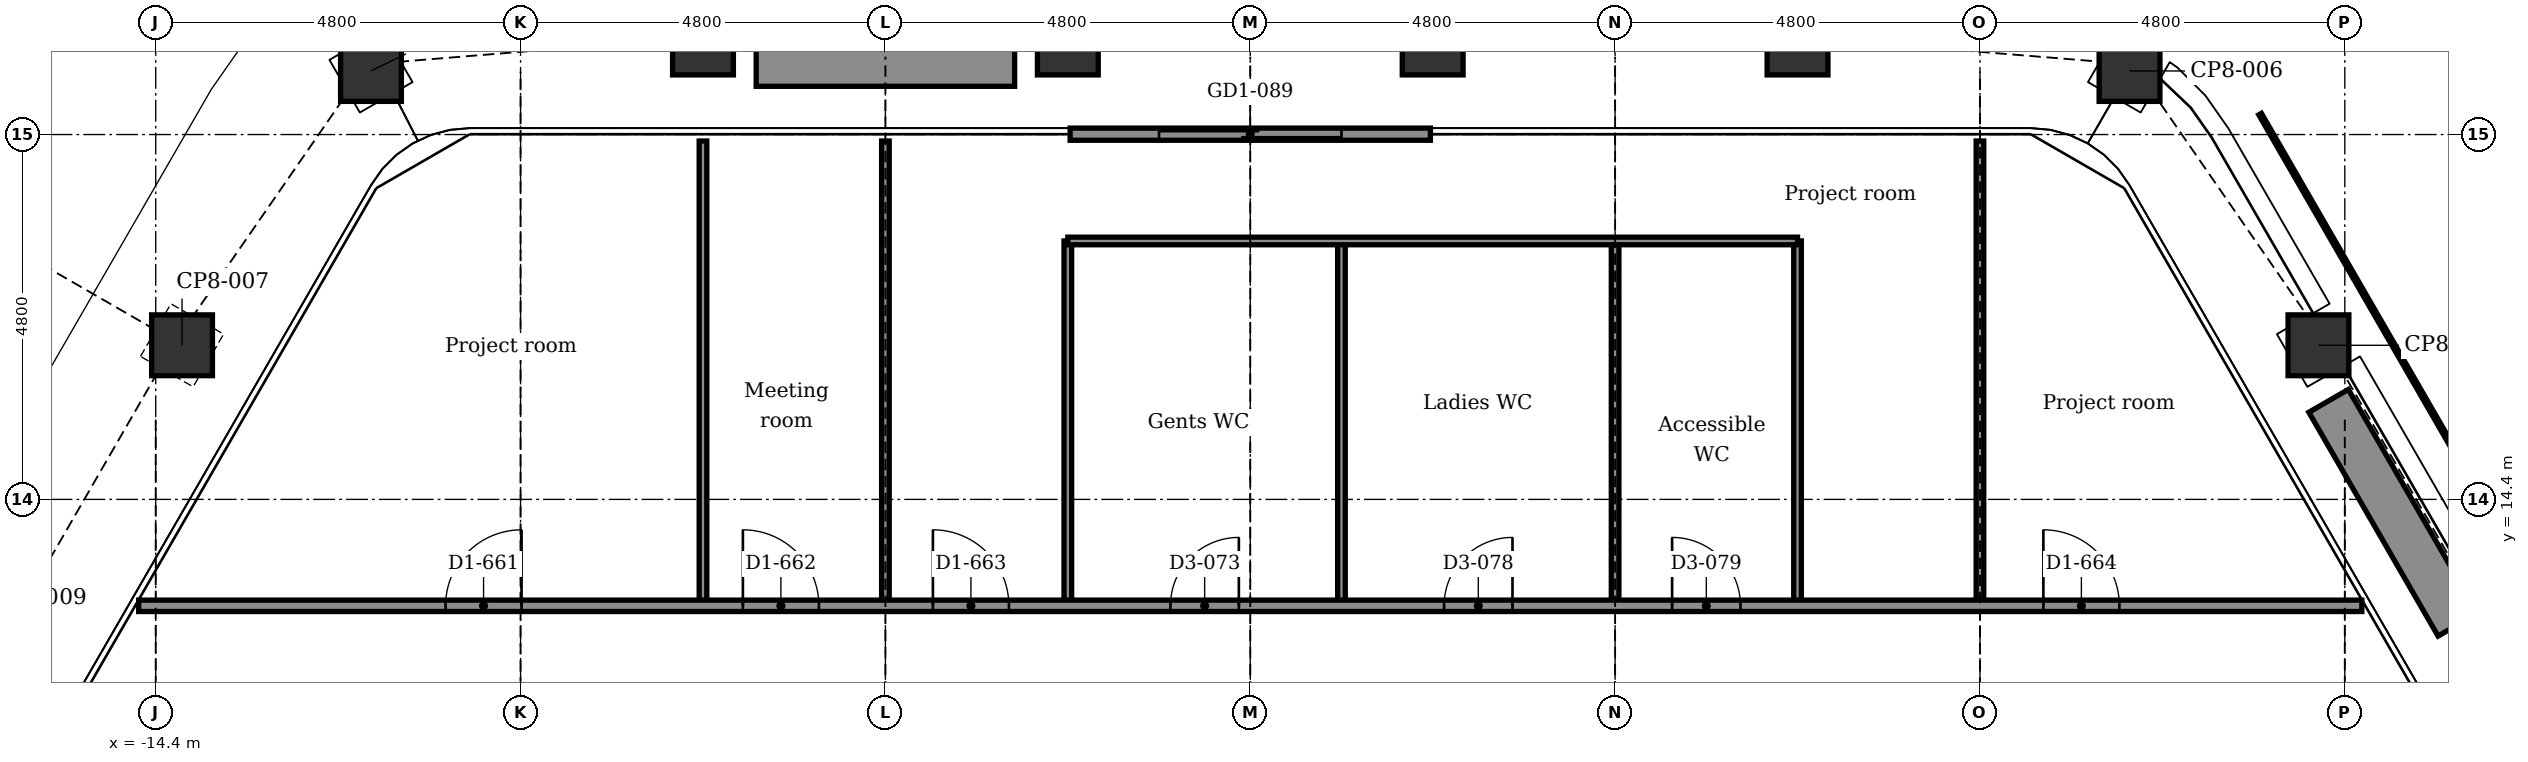
"""IFC4 building model, lengths in metres.
Left out: names, types, materials, properties, quantities, classifications, styles, units other than length and angle.
Written with IfcOpenShell. Run it as: python <this file> out.ifc"""

import sys

from ifc_helpers import new_model, si_unit, direction, frame, frame_2d, origin, origin_2d, place, context, subcontext, project, spatial, rectangle, extrude, element, fill, save


model = new_model("IFC4")
c1 = context("Model", 3, precision=1e-05, world=origin(), true_north=direction((0.0, 1.0)))
c2 = subcontext(c1, "Body", "Model", "MODEL_VIEW")
j1 = project(units=[si_unit("LENGTHUNIT", "METRE"), si_unit("PLANEANGLEUNIT", "RADIAN")], contexts=[c1])
p1 = place(None, origin())
s1 = spatial("IfcSite", under=j1, at=p1, CompositionType="ELEMENT")
p2 = place(p1, origin())
s2 = spatial("IfcBuilding", under=s1, at=p2, CompositionType="ELEMENT")
p3 = place(p2, frame((0.0, 0.0, 238.4)))
s3 = spatial("IfcBuildingStorey", under=s2, at=p3, CompositionType="ELEMENT", Elevation=238.4)
for number, where, z_axis, x_axis in (
    (1, (-11.568, 20.036, -0.15), (0.0, 0.0, 1.0), (0.866, 0.5, 0.0)),
    (2, (-7.2, 20.385, -0.15), (0.0, 0.0, 1.0), (1.0, 0.0, 0.0)),
    (3, (-2.4, 20.385, -0.15), (0.0, 0.0, 1.0), (1.0, 0.0, 0.0)),
    (4, (2.4, 20.385, -0.15), (0.0, 0.0, 1.0), (1.0, 0.0, 0.0)),
    (5, (7.2, 20.385, -0.15), (0.0, 0.0, 1.0), (1.0, 0.0, 0.0)),
    (6, (11.568, 20.036, -0.15), (0.0, 0.0, 1.0), (0.5, 0.866, 0.0)),
    (7, (14.054, 16.428, -0.15), (0.0, 0.0, 1.0), (0.866, 0.5, 0.0)),
    (8, (-14.054, 16.428, -0.15), (0.0, 0.0, 1.0), (0.5, 0.866, 0.0)),
):
    element("IfcColumn", number, at=place(p3, frame(where, z_axis=z_axis, x_axis=x_axis)), inside=s3, PredefinedType="COLUMN", context=c2, shape_type="SweptSolid", body=[
        extrude(rectangle(XDim=0.8, YDim=0.8, at=origin_2d()), origin(), (0.0, 0.0, 1.0), 3.9),
    ])
p4 = place(p3, frame((-2.37, 19.205, 0.0), z_axis=(0.0, 0.0, 1.0), x_axis=(1.0, 0.0, 0.0)))
e9 = element("IfcWall", 9, at=p4, inside=s3, PredefinedType="PARTITIONING", context=c2, shape_type="SweptSolid", body=[
    extrude(rectangle(XDim=4.74, YDim=0.16, at=frame_2d((2.37, 0.0))), origin(), (0.0, 0.0, 1.0), 3.75),
])
p5 = place(p4, frame((1.17, 0.0, 0.0)))
e10 = element("IfcOpeningElement", 10, at=p5, cuts=e9, PredefinedType="OPENING", context=c2, shape_type="SweptSolid", body=[
    extrude(rectangle(XDim=2.4, YDim=2.4, at=frame_2d((1.2, 1.2))), frame((0.0, 0.09, 0.0), z_axis=(0.0, -1.0, 0.0), x_axis=(1.0, 0.0, 0.0)), (0.0, 0.0, 1.0), 0.18),
])
p6 = place(p3, frame((-6.5, 20.135, 0.0), z_axis=(0.0, 0.0, 1.0), x_axis=(1.0, 0.0, 0.0)))
e11 = element("IfcWall", 11, at=p6, inside=s3, PredefinedType="USERDEFINED", context=c2, shape_type="SweptSolid", body=[
    extrude(rectangle(XDim=3.4, YDim=0.6, at=frame_2d((1.7, 0.0))), origin(), (0.0, 0.0, 1.0), 0.7),
])
p7 = place(p3, frame((14.187, 15.697, 0.0), z_axis=(0.0, 0.0, 1.0), x_axis=(0.499977295307, -0.866038511948, 0.0)))
e12 = element("IfcWall", 12, at=p7, inside=s3, PredefinedType="USERDEFINED", context=c2, shape_type="SweptSolid", body=[
    extrude(rectangle(XDim=3.4, YDim=0.6, at=frame_2d((1.7, 0.0))), origin(), (0.0, 0.0, 1.0), 0.7),
])
p8 = place(p3, frame((9.6, 13.0, 0.0), z_axis=(0.0, 0.0, 1.0), x_axis=(0.0, 1.0, 0.0)))
e13 = element("IfcWall", 13, at=p8, inside=s3, PredefinedType="PARTITIONING", context=c2, shape_type="SweptSolid", body=[
    extrude(rectangle(XDim=6.115, YDim=0.1, at=frame_2d((3.057, 0.0))), origin(), (0.0, 0.0, 1.0), 3.217),
])
p9 = place(p3, frame((7.2, 13.0, 0.0), z_axis=(0.0, 0.0, 1.0), x_axis=(0.0, 1.0, 0.0)))
e14 = element("IfcWall", 14, at=p9, inside=s3, PredefinedType="PARTITIONING", context=c2, shape_type="SweptSolid", body=[
    extrude(rectangle(XDim=4.8, YDim=0.1, at=frame_2d((2.4, 0.0))), origin(), (0.0, 0.0, 1.0), 3.75),
])
p10 = place(p3, frame((4.8, 13.0, 0.0), z_axis=(0.0, 0.0, 1.0), x_axis=(0.0, 1.0, 0.0)))
e15 = element("IfcWall", 15, at=p10, inside=s3, PredefinedType="PARTITIONING", context=c2, shape_type="SweptSolid", body=[
    extrude(rectangle(XDim=4.8, YDim=0.1, at=frame_2d((2.4, 0.0))), origin(), (0.0, 0.0, 1.0), 3.217),
])
for number, where, z_axis, x_axis in (
    (16, (1.2, 13.0, 0.0), (0.0, 0.0, 1.0), (0.0, 1.0, 0.0)),
    (17, (-2.4, 13.0, 0.0), (0.0, 0.0, 1.0), (0.0, 1.0, 0.0)),
):
    element("IfcWall", number, at=place(p3, frame(where, z_axis=z_axis, x_axis=x_axis)), inside=s3, PredefinedType="PARTITIONING", context=c2, shape_type="SweptSolid", body=[
        extrude(rectangle(XDim=4.8, YDim=0.1, at=frame_2d((2.4, 0.0))), origin(), (0.0, 0.0, 1.0), 3.75),
    ])
p11 = place(p3, frame((-4.8, 13.0, 0.0), z_axis=(0.0, 0.0, 1.0), x_axis=(0.0, 1.0, 0.0)))
e18 = element("IfcWall", 18, at=p11, inside=s3, PredefinedType="PARTITIONING", context=c2, shape_type="SweptSolid", body=[
    extrude(rectangle(XDim=6.115, YDim=0.1, at=frame_2d((3.057, 0.0))), origin(), (0.0, 0.0, 1.0), 3.217),
])
p12 = place(p3, frame((-7.2, 13.0, 0.0), z_axis=(0.0, 0.0, 1.0), x_axis=(0.0, 1.0, 0.0)))
e19 = element("IfcWall", 19, at=p12, inside=s3, PredefinedType="PARTITIONING", context=c2, shape_type="SweptSolid", body=[
    extrude(rectangle(XDim=6.115, YDim=0.1, at=frame_2d((3.057, 0.0))), origin(), (0.0, 0.0, 1.0), 3.75),
])
p13 = place(p3, frame((-14.624, 13.0, 0.0), z_axis=(0.0, 0.0, 1.0), x_axis=(1.0, 0.0, 0.0)))
e20 = element("IfcWall", 20, at=p13, inside=s3, PredefinedType="PARTITIONING", context=c2, shape_type="SweptSolid", body=[
    extrude(rectangle(XDim=29.248, YDim=0.15, at=frame_2d((14.624, 0.0))), origin(), (0.0, 0.0, 1.0), 3.75),
])
p14 = place(p13, frame((13.574, 0.0, 0.0)))
e21 = element("IfcOpeningElement", 21, at=p14, cuts=e20, PredefinedType="OPENING", context=c2, shape_type="SweptSolid", body=[
    extrude(rectangle(XDim=0.9, YDim=2.1, at=frame_2d((0.45, 1.05))), frame((0.0, 0.085, 0.0), z_axis=(0.0, -1.0, 0.0), x_axis=(1.0, 0.0, 0.0)), (0.0, 0.0, 1.0), 0.17),
])
p15 = place(p13, frame((17.174, 0.0, 0.0)))
e22 = element("IfcOpeningElement", 22, at=p15, cuts=e20, PredefinedType="OPENING", context=c2, shape_type="SweptSolid", body=[
    extrude(rectangle(XDim=0.9, YDim=2.1, at=frame_2d((0.45, 1.05))), frame((0.0, 0.085, 0.0), z_axis=(0.0, -1.0, 0.0), x_axis=(1.0, 0.0, 0.0)), (0.0, 0.0, 1.0), 0.17),
])
p16 = place(p13, frame((20.174, 0.0, 0.0)))
e23 = element("IfcOpeningElement", 23, at=p16, cuts=e20, PredefinedType="OPENING", context=c2, shape_type="SweptSolid", body=[
    extrude(rectangle(XDim=0.9, YDim=2.1, at=frame_2d((0.45, 1.05))), frame((0.0, 0.085, 0.0), z_axis=(0.0, -1.0, 0.0), x_axis=(1.0, 0.0, 0.0)), (0.0, 0.0, 1.0), 0.17),
])
p17 = place(p13, frame((4.037, 0.0, 0.0)))
e24 = element("IfcOpeningElement", 24, at=p17, cuts=e20, PredefinedType="OPENING", context=c2, shape_type="SweptSolid", body=[
    extrude(rectangle(XDim=1.0, YDim=2.1, at=frame_2d((0.5, 1.05))), frame((0.0, 0.085, 0.0), z_axis=(0.0, -1.0, 0.0), x_axis=(1.0, 0.0, 0.0)), (0.0, 0.0, 1.0), 0.17),
])
p18 = place(p13, frame((7.949, 0.0, 0.0)))
e25 = element("IfcOpeningElement", 25, at=p18, cuts=e20, PredefinedType="OPENING", context=c2, shape_type="SweptSolid", body=[
    extrude(rectangle(XDim=1.0, YDim=2.1, at=frame_2d((0.5, 1.05))), frame((0.0, 0.085, 0.0), z_axis=(0.0, -1.0, 0.0), x_axis=(1.0, 0.0, 0.0)), (0.0, 0.0, 1.0), 0.17),
])
p19 = place(p13, frame((10.449, 0.0, 0.0)))
e26 = element("IfcOpeningElement", 26, at=p19, cuts=e20, PredefinedType="OPENING", context=c2, shape_type="SweptSolid", body=[
    extrude(rectangle(XDim=1.0, YDim=2.1, at=frame_2d((0.5, 1.05))), frame((0.0, 0.085, 0.0), z_axis=(0.0, -1.0, 0.0), x_axis=(1.0, 0.0, 0.0)), (0.0, 0.0, 1.0), 0.17),
])
p20 = place(p13, frame((25.058, 0.0, 0.0)))
e27 = element("IfcOpeningElement", 27, at=p20, cuts=e20, PredefinedType="OPENING", context=c2, shape_type="SweptSolid", body=[
    extrude(rectangle(XDim=1.0, YDim=2.1, at=frame_2d((0.5, 1.05))), frame((0.0, 0.085, 0.0), z_axis=(0.0, -1.0, 0.0), x_axis=(1.0, 0.0, 0.0)), (0.0, 0.0, 1.0), 0.17),
])
p21 = place(p3, frame((-2.4, 17.8, 0.0), z_axis=(0.0, 0.0, 1.0), x_axis=(1.0, 0.0, 0.0)))
e28 = element("IfcWall", 28, at=p21, inside=s3, PredefinedType="PARTITIONING", context=c2, shape_type="SweptSolid", body=[
    extrude(rectangle(XDim=9.6, YDim=0.1, at=frame_2d((4.8, 0.0))), origin(), (0.0, 0.0, 1.0), 3.75),
])
p22 = place(p5, origin())
e29 = element("IfcDoor", 29, at=p22, inside=s3, OperationType="DOUBLE_DOOR_SLIDING", PredefinedType="DOOR", context=c2, shape_type="SweptSolid", body=[
    extrude(rectangle(XDim=2.4, YDim=2.4, at=frame_2d((1.2, 1.2))), frame((0.0, 0.025, 0.0), z_axis=(0.0, -1.0, 0.0), x_axis=(1.0, 0.0, 0.0)), (0.0, 0.0, 1.0), 0.05),
])
fill(e10, e29)
p23 = place(p14, origin())
e30 = element("IfcDoor", 30, at=p23, inside=s3, OperationType="SINGLE_SWING_RIGHT", PredefinedType="DOOR", context=c2, shape_type="SweptSolid", body=[
    extrude(rectangle(XDim=0.9, YDim=2.1, at=frame_2d((0.45, 1.05))), frame((0.0, 0.025, 0.0), z_axis=(0.0, -1.0, 0.0), x_axis=(1.0, 0.0, 0.0)), (0.0, 0.0, 1.0), 0.05),
])
fill(e21, e30)
p24 = place(p15, origin())
e31 = element("IfcDoor", 31, at=p24, inside=s3, OperationType="SINGLE_SWING_RIGHT", PredefinedType="DOOR", context=c2, shape_type="SweptSolid", body=[
    extrude(rectangle(XDim=0.9, YDim=2.1, at=frame_2d((0.45, 1.05))), frame((0.0, 0.025, 0.0), z_axis=(0.0, -1.0, 0.0), x_axis=(1.0, 0.0, 0.0)), (0.0, 0.0, 1.0), 0.05),
])
fill(e22, e31)
p25 = place(p16, origin())
e32 = element("IfcDoor", 32, at=p25, inside=s3, OperationType="SINGLE_SWING_LEFT", PredefinedType="DOOR", context=c2, shape_type="SweptSolid", body=[
    extrude(rectangle(XDim=0.9, YDim=2.1, at=frame_2d((0.45, 1.05))), frame((0.0, 0.025, 0.0), z_axis=(0.0, -1.0, 0.0), x_axis=(1.0, 0.0, 0.0)), (0.0, 0.0, 1.0), 0.05),
])
fill(e23, e32)
p26 = place(p17, origin())
e33 = element("IfcDoor", 33, at=p26, inside=s3, OperationType="SINGLE_SWING_RIGHT", PredefinedType="DOOR", context=c2, shape_type="SweptSolid", body=[
    extrude(rectangle(XDim=1.0, YDim=2.1, at=frame_2d((0.5, 1.05))), frame((0.0, 0.025, 0.0), z_axis=(0.0, -1.0, 0.0), x_axis=(1.0, 0.0, 0.0)), (0.0, 0.0, 1.0), 0.05),
])
fill(e24, e33)
p27 = place(p18, origin())
e34 = element("IfcDoor", 34, at=p27, inside=s3, OperationType="SINGLE_SWING_LEFT", PredefinedType="DOOR", context=c2, shape_type="SweptSolid", body=[
    extrude(rectangle(XDim=1.0, YDim=2.1, at=frame_2d((0.5, 1.05))), frame((0.0, 0.025, 0.0), z_axis=(0.0, -1.0, 0.0), x_axis=(1.0, 0.0, 0.0)), (0.0, 0.0, 1.0), 0.05),
])
fill(e25, e34)
p28 = place(p19, origin())
e35 = element("IfcDoor", 35, at=p28, inside=s3, OperationType="SINGLE_SWING_LEFT", PredefinedType="DOOR", context=c2, shape_type="SweptSolid", body=[
    extrude(rectangle(XDim=1.0, YDim=2.1, at=frame_2d((0.5, 1.05))), frame((0.0, 0.025, 0.0), z_axis=(0.0, -1.0, 0.0), x_axis=(1.0, 0.0, 0.0)), (0.0, 0.0, 1.0), 0.05),
])
fill(e26, e35)
p29 = place(p20, origin())
e36 = element("IfcDoor", 36, at=p29, inside=s3, OperationType="SINGLE_SWING_LEFT", PredefinedType="DOOR", context=c2, shape_type="SweptSolid", body=[
    extrude(rectangle(XDim=1.0, YDim=2.1, at=frame_2d((0.5, 1.05))), frame((0.0, 0.025, 0.0), z_axis=(0.0, -1.0, 0.0), x_axis=(1.0, 0.0, 0.0)), (0.0, 0.0, 1.0), 0.05),
])
fill(e27, e36)
save(model, sys.argv[1])
